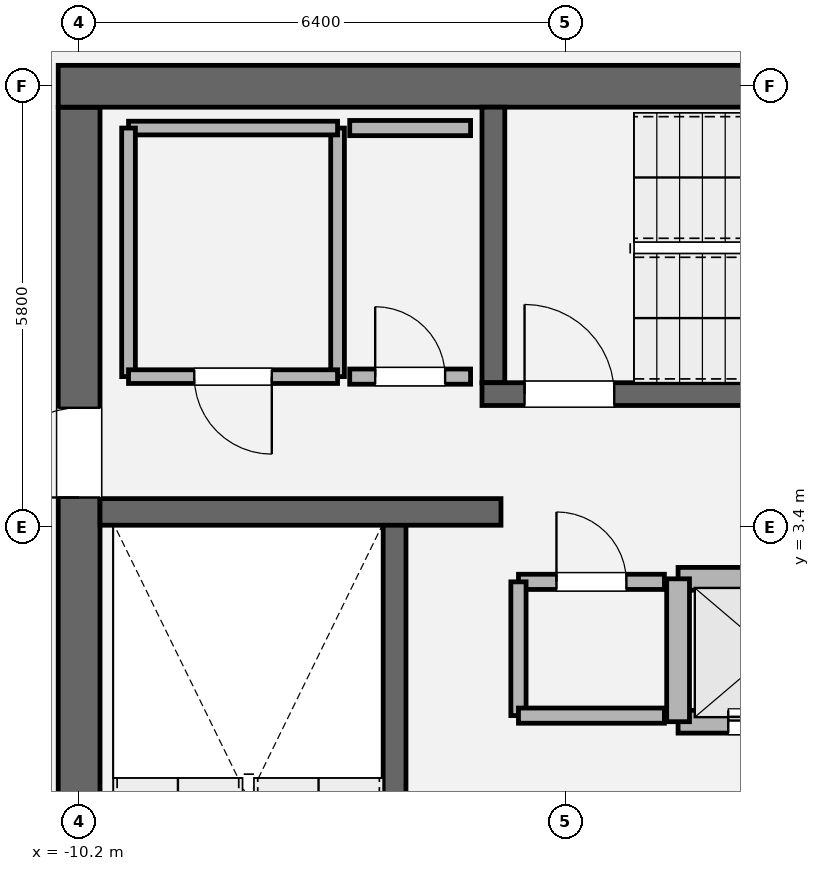
"""IFC4 building model, lengths in metres.
Left out: names, types, materials, properties, quantities, classifications, styles, units other than length and angle.
Written with IfcOpenShell. Run it as: python <this file> out.ifc"""

import sys

from ifc_helpers import new_model, si_unit, direction, frame, frame_2d, origin, place, context, subcontext, project, spatial, rectangle, extrude, element, fill, save


model = new_model("IFC4")
c1 = context("Model", 3, precision=1e-05, world=origin(), true_north=direction((0.0, 1.0)))
c2 = subcontext(c1, "Body", "Model", "MODEL_VIEW")
j1 = project(units=[si_unit("LENGTHUNIT", "METRE"), si_unit("PLANEANGLEUNIT", "RADIAN")], contexts=[c1])
p1 = place(None, origin())
s1 = spatial("IfcSite", under=j1, at=p1, CompositionType="ELEMENT")
p2 = place(p1, origin())
s2 = spatial("IfcBuilding", under=s1, at=p2, CompositionType="ELEMENT")
p3 = place(p2, frame((0.0, 0.0, 288.0)))
s3 = spatial("IfcBuildingStorey", under=s2, at=p3, CompositionType="ELEMENT", Elevation=288.0)
p4 = place(p3, frame((-10.2, -8.925, 0.0), z_axis=(0.0, 0.0, 1.0), x_axis=(0.0, 1.0, 0.0)))
e1 = element("IfcWall", 1, at=p4, inside=s3, PredefinedType="SHEAR", context=c2, shape_type="SweptSolid", body=[
    extrude(rectangle(XDim=17.85, YDim=0.55, at=frame_2d((8.925, 0.0))), origin(), (0.0, 0.0, 1.0), 4.2),
])
p5 = place(p4, frame((12.715, 0.0, 0.0)))
e2 = element("IfcOpeningElement", 2, at=p5, cuts=e1, PredefinedType="OPENING", context=c2, shape_type="SweptSolid", body=[
    extrude(rectangle(XDim=1.18, YDim=2.2, at=frame_2d((0.59, 1.1))), frame((0.0, 0.285, 0.0), z_axis=(0.0, -1.0, 0.0), x_axis=(1.0, 0.0, 0.0)), (0.0, 0.0, 1.0), 0.57),
])
p6 = place(p3, frame((-10.475, 9.2, 0.0), z_axis=(0.0, 0.0, 1.0), x_axis=(1.0, 0.0, 0.0)))
e3 = element("IfcWall", 3, at=p6, inside=s3, PredefinedType="SHEAR", context=c2, shape_type="SweptSolid", body=[
    extrude(rectangle(XDim=20.95, YDim=0.55, at=frame_2d((10.475, 0.0))), origin(), (0.0, 0.0, 1.0), 4.2),
])
p7 = place(p3, frame((-6.05, -5.5, 0.0), z_axis=(0.0, 0.0, 1.0), x_axis=(0.0, 1.0, 0.0)))
e4 = element("IfcWall", 4, at=p7, inside=s3, PredefinedType="SOLIDWALL", context=c2, shape_type="SweptSolid", body=[
    extrude(rectangle(XDim=8.95, YDim=0.3, at=frame_2d((4.475, 0.0))), origin(), (0.0, 0.0, 1.0), 4.2),
])
p8 = place(p3, frame((-4.75, 5.3, 0.0), z_axis=(0.0, 0.0, 1.0), x_axis=(0.0, 1.0, 0.0)))
e5 = element("IfcWall", 5, at=p8, inside=s3, PredefinedType="SOLIDWALL", context=c2, shape_type="SweptSolid", body=[
    extrude(rectangle(XDim=3.625, YDim=0.3, at=frame_2d((1.812, 0.0))), origin(), (0.0, 0.0, 1.0), 4.2),
])
p9 = place(p3, frame((-4.9, 5.15, 0.0), z_axis=(0.0, 0.0, 1.0), x_axis=(1.0, 0.0, 0.0)))
e6 = element("IfcWall", 6, at=p9, inside=s3, PredefinedType="SOLIDWALL", context=c2, shape_type="SweptSolid", body=[
    extrude(rectangle(XDim=9.8, YDim=0.3, at=frame_2d((4.9, 0.0))), origin(), (0.0, 0.0, 1.0), 4.2),
])
p10 = place(p9, frame((0.56, 0.0, 0.0)))
e7 = element("IfcOpeningElement", 7, at=p10, cuts=e6, PredefinedType="OPENING", context=c2, shape_type="SweptSolid", body=[
    extrude(rectangle(XDim=1.18, YDim=2.2, at=frame_2d((0.59, 1.1))), frame((0.0, 0.16, 0.0), z_axis=(0.0, -1.0, 0.0), x_axis=(1.0, 0.0, 0.0)), (0.0, 0.0, 1.0), 0.32),
])
p11 = place(p3, frame((-9.925, 3.6, 0.0), z_axis=(0.0, 0.0, 1.0), x_axis=(1.0, 0.0, 0.0)))
e8 = element("IfcWall", 8, at=p11, inside=s3, PredefinedType="SOLIDWALL", context=c2, shape_type="SweptSolid", body=[
    extrude(rectangle(XDim=5.275, YDim=0.35, at=frame_2d((2.638, 0.0))), origin(), (0.0, 0.0, 1.0), 4.2),
])
p12 = place(p3, frame((-2.32, 0.84, 0.0), z_axis=(0.0, 0.0, 1.0), x_axis=(1.0, 0.0, 0.0)))
e9 = element("IfcWall", 9, at=p12, inside=s3, PredefinedType="SOLIDWALL", context=c2, shape_type="SweptSolid", body=[
    extrude(rectangle(XDim=4.64, YDim=0.3, at=frame_2d((2.32, 0.0))), origin(), (0.0, 0.0, 1.0), 4.0),
])
p13 = place(p12, frame((0.66, 0.0, 0.0)))
e10 = element("IfcOpeningElement", 10, at=p13, cuts=e9, PredefinedType="OPENING", context=c2, shape_type="SweptSolid", body=[
    extrude(rectangle(XDim=1.12, YDim=2.25, at=frame_2d((0.56, 1.125))), frame((0.0, 0.16, 0.0), z_axis=(0.0, -1.0, 0.0), x_axis=(1.0, 0.0, 0.0)), (0.0, 0.0, 1.0), 0.32),
])
p14 = place(p12, frame((2.86, 0.0, 0.0)))
e11 = element("IfcOpeningElement", 11, at=p14, cuts=e9, PredefinedType="OPENING", context=c2, shape_type="SweptSolid", body=[
    extrude(rectangle(XDim=1.12, YDim=2.25, at=frame_2d((0.56, 1.125))), frame((0.0, 0.16, 0.0), z_axis=(0.0, -1.0, 0.0), x_axis=(1.0, 0.0, 0.0)), (0.0, 0.0, 1.0), 0.32),
])
p15 = place(p3, frame((-2.32, 2.72, 0.0), z_axis=(0.0, 0.0, 1.0), x_axis=(1.0, 0.0, 0.0)))
e12 = element("IfcWall", 12, at=p15, inside=s3, PredefinedType="SOLIDWALL", context=c2, shape_type="SweptSolid", body=[
    extrude(rectangle(XDim=4.64, YDim=0.3, at=frame_2d((2.32, 0.0))), origin(), (0.0, 0.0, 1.0), 4.0),
])
p16 = place(p3, frame((-2.32, 0.84, 0.0), z_axis=(0.0, 0.0, 1.0), x_axis=(0.0, 1.0, 0.0)))
e13 = element("IfcWall", 13, at=p16, inside=s3, PredefinedType="SOLIDWALL", context=c2, shape_type="SweptSolid", body=[
    extrude(rectangle(XDim=1.88, YDim=0.3, at=frame_2d((0.94, 0.0))), origin(), (0.0, 0.0, 1.0), 4.0),
])
p17 = place(p3, frame((-2.5, 2.68, 0.0), z_axis=(0.0, 0.0, 1.0), x_axis=(-1.0, 0.0, 0.0)))
e14 = element("IfcWall", 14, at=p17, inside=s3, PredefinedType="SOLIDWALL", context=c2, shape_type="SweptSolid", body=[
    extrude(rectangle(XDim=1.92, YDim=0.2, at=frame_2d((0.96, 0.0))), origin(), (0.0, 0.0, 1.0), 4.0),
])
p18 = place(p17, frame((0.5, 0.0, 0.0)))
e15 = element("IfcOpeningElement", 15, at=p18, cuts=e14, PredefinedType="OPENING", context=c2, shape_type="SweptSolid", body=[
    extrude(rectangle(XDim=0.92, YDim=2.1, at=frame_2d((0.46, 1.05))), frame((0.0, 0.11, 0.0), z_axis=(0.0, -1.0, 0.0), x_axis=(1.0, 0.0, 0.0)), (0.0, 0.0, 1.0), 0.22),
])
p19 = place(p3, frame((-4.42, 2.68, 0.0), z_axis=(0.0, 0.0, 1.0), x_axis=(0.0, -1.0, 0.0)))
e16 = element("IfcWall", 16, at=p19, inside=s3, PredefinedType="SOLIDWALL", context=c2, shape_type="SweptSolid", body=[
    extrude(rectangle(XDim=1.76, YDim=0.2, at=frame_2d((0.88, 0.0))), origin(), (0.0, 0.0, 1.0), 4.0),
])
p20 = place(p3, frame((-4.42, 0.92, 0.0), z_axis=(0.0, 0.0, 1.0), x_axis=(1.0, 0.0, 0.0)))
e17 = element("IfcWall", 17, at=p20, inside=s3, PredefinedType="SOLIDWALL", context=c2, shape_type="SweptSolid", body=[
    extrude(rectangle(XDim=1.92, YDim=0.2, at=frame_2d((0.96, 0.0))), origin(), (0.0, 0.0, 1.0), 4.0),
])
p21 = place(p3, frame((-6.8, 5.38, 0.0), z_axis=(0.0, 0.0, 1.0), x_axis=(0.0, 1.0, 0.0)))
e18 = element("IfcWall", 18, at=p21, inside=s3, PredefinedType="PARTITIONING", context=c2, shape_type="SweptSolid", body=[
    extrude(rectangle(XDim=3.27, YDim=0.18, at=frame_2d((1.635, 0.0))), origin(), (0.0, 0.0, 1.0), 4.0),
])
p22 = place(p3, frame((-6.8, 8.65, 0.0), z_axis=(0.0, 0.0, 1.0), x_axis=(-1.0, 0.0, 0.0)))
e19 = element("IfcWall", 19, at=p22, inside=s3, PredefinedType="PARTITIONING", context=c2, shape_type="SweptSolid", body=[
    extrude(rectangle(XDim=2.75, YDim=0.18, at=frame_2d((1.375, 0.0))), origin(), (0.0, 0.0, 1.0), 4.0),
])
p23 = place(p3, frame((-9.55, 8.65, 0.0), z_axis=(0.0, 0.0, 1.0), x_axis=(0.0, -1.0, 0.0)))
e20 = element("IfcWall", 20, at=p23, inside=s3, PredefinedType="PARTITIONING", context=c2, shape_type="SweptSolid", body=[
    extrude(rectangle(XDim=3.27, YDim=0.18, at=frame_2d((1.635, 0.0))), origin(), (0.0, 0.0, 1.0), 4.0),
])
p24 = place(p3, frame((-9.55, 5.38, 0.0), z_axis=(0.0, 0.0, 1.0), x_axis=(1.0, 0.0, 0.0)))
e21 = element("IfcWall", 21, at=p24, inside=s3, PredefinedType="PARTITIONING", context=c2, shape_type="SweptSolid", body=[
    extrude(rectangle(XDim=2.75, YDim=0.18, at=frame_2d((1.375, 0.0))), origin(), (0.0, 0.0, 1.0), 4.0),
])
p25 = place(p24, frame((0.865, 0.0, 0.0)))
e22 = element("IfcOpeningElement", 22, at=p25, cuts=e21, PredefinedType="OPENING", context=c2, shape_type="SweptSolid", body=[
    extrude(rectangle(XDim=1.02, YDim=2.2, at=frame_2d((0.51, 1.1))), frame((0.0, 0.1, 0.0), z_axis=(0.0, -1.0, 0.0), x_axis=(1.0, 0.0, 0.0)), (0.0, 0.0, 1.0), 0.2),
])
p26 = place(p3, frame((-5.05, 8.65, 0.0), z_axis=(0.0, 0.0, 1.0), x_axis=(-1.0, 0.0, 0.0)))
e23 = element("IfcWall", 23, at=p26, inside=s3, PredefinedType="SOLIDWALL", context=c2, shape_type="SweptSolid", body=[
    extrude(rectangle(XDim=1.59, YDim=0.2, at=frame_2d((0.795, 0.0))), origin(), (0.0, 0.0, 1.0), 4.0),
])
p27 = place(p3, frame((-6.64, 5.38, 0.0), z_axis=(0.0, 0.0, 1.0), x_axis=(1.0, 0.0, 0.0)))
e24 = element("IfcWall", 24, at=p27, inside=s3, PredefinedType="SOLIDWALL", context=c2, shape_type="SweptSolid", body=[
    extrude(rectangle(XDim=1.59, YDim=0.2, at=frame_2d((0.795, 0.0))), origin(), (0.0, 0.0, 1.0), 4.0),
])
p28 = place(p27, frame((0.335, 0.0, 0.0)))
e25 = element("IfcOpeningElement", 25, at=p28, cuts=e24, PredefinedType="OPENING", context=c2, shape_type="SweptSolid", body=[
    extrude(rectangle(XDim=0.92, YDim=2.1, at=frame_2d((0.46, 1.05))), frame((0.0, 0.11, 0.0), z_axis=(0.0, -1.0, 0.0), x_axis=(1.0, 0.0, 0.0)), (0.0, 0.0, 1.0), 0.22),
])
p29 = place(p10, origin())
e26 = element("IfcDoor", 26, at=p29, inside=s3, OperationType="SINGLE_SWING_LEFT", PredefinedType="DOOR", context=c2, shape_type="SweptSolid", body=[
    extrude(rectangle(XDim=1.18, YDim=2.2, at=frame_2d((0.59, 1.1))), frame((0.0, 0.025, 0.0), z_axis=(0.0, -1.0, 0.0), x_axis=(1.0, 0.0, 0.0)), (0.0, 0.0, 1.0), 0.05),
])
fill(e7, e26)
p30 = place(p5, origin())
e27 = element("IfcDoor", 27, at=p30, inside=s3, OperationType="SINGLE_SWING_LEFT", PredefinedType="DOOR", context=c2, shape_type="SweptSolid", body=[
    extrude(rectangle(XDim=1.18, YDim=2.2, at=frame_2d((0.59, 1.1))), frame((0.0, 0.025, 0.0), z_axis=(0.0, -1.0, 0.0), x_axis=(1.0, 0.0, 0.0)), (0.0, 0.0, 1.0), 0.05),
])
fill(e2, e27)
p31 = place(p13, origin())
e28 = element("IfcDoor", 28, at=p31, inside=s3, OperationType="DOUBLE_DOOR_SLIDING", PredefinedType="DOOR", context=c2, shape_type="SweptSolid", body=[
    extrude(rectangle(XDim=1.12, YDim=2.25, at=frame_2d((0.56, 1.125))), frame((0.0, 0.025, 0.0), z_axis=(0.0, -1.0, 0.0), x_axis=(1.0, 0.0, 0.0)), (0.0, 0.0, 1.0), 0.05),
])
fill(e10, e28)
p32 = place(p18, origin())
e29 = element("IfcDoor", 29, at=p32, inside=s3, OperationType="SINGLE_SWING_RIGHT", PredefinedType="DOOR", context=c2, shape_type="SweptSolid", body=[
    extrude(rectangle(XDim=0.92, YDim=2.1, at=frame_2d((0.46, 1.05))), frame((0.0, 0.025, 0.0), z_axis=(0.0, -1.0, 0.0), x_axis=(1.0, 0.0, 0.0)), (0.0, 0.0, 1.0), 0.05),
])
fill(e15, e29)
p33 = place(p25, origin())
e30 = element("IfcDoor", 30, at=p33, inside=s3, OperationType="SINGLE_SWING_RIGHT", PredefinedType="DOOR", context=c2, shape_type="SweptSolid", body=[
    extrude(rectangle(XDim=1.02, YDim=2.2, at=frame_2d((0.51, 1.1))), frame((0.0, 0.025, 0.0), z_axis=(0.0, -1.0, 0.0), x_axis=(1.0, 0.0, 0.0)), (0.0, 0.0, 1.0), 0.05),
])
fill(e22, e30)
p34 = place(p28, origin())
e31 = element("IfcDoor", 31, at=p34, inside=s3, OperationType="SINGLE_SWING_LEFT", PredefinedType="DOOR", context=c2, shape_type="SweptSolid", body=[
    extrude(rectangle(XDim=0.92, YDim=2.1, at=frame_2d((0.46, 1.05))), frame((0.0, 0.025, 0.0), z_axis=(0.0, -1.0, 0.0), x_axis=(1.0, 0.0, 0.0)), (0.0, 0.0, 1.0), 0.05),
])
fill(e25, e31)
save(model, sys.argv[1])
